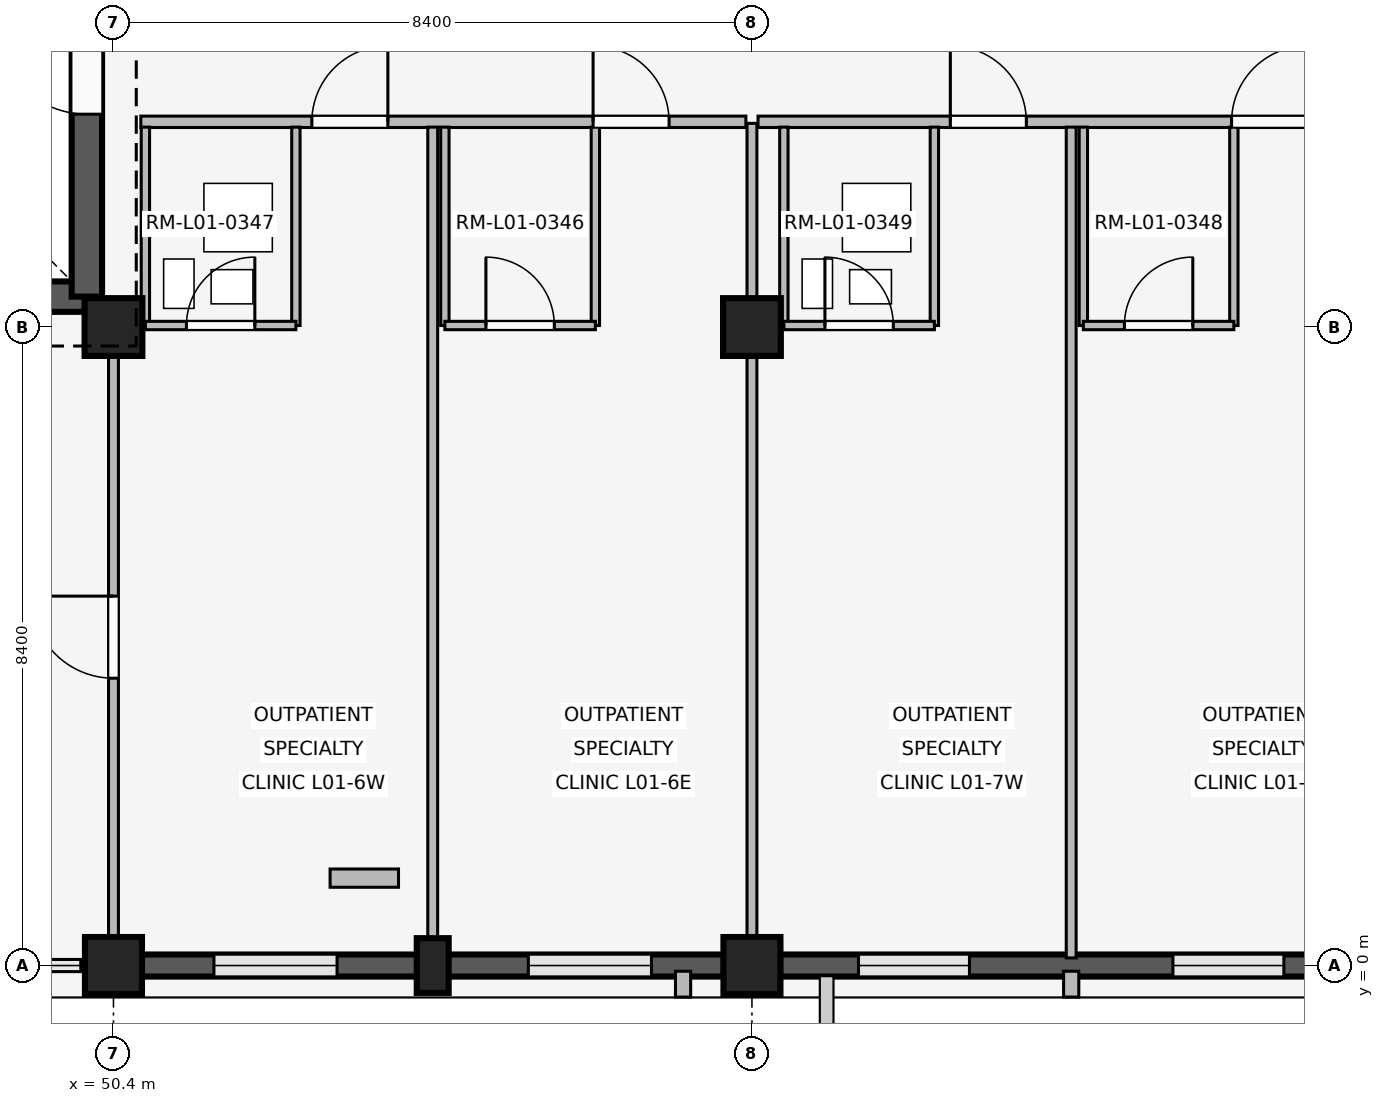
"""IFC4 building model, lengths in metres.
Left out: names, types, materials, properties, quantities, classifications, styles, units other than length and angle.
Written with IfcOpenShell. Run it as: python <this file> out.ifc"""

import sys

from ifc_helpers import new_model, si_unit, direction, frame, frame_2d, origin, origin_2d, place, context, subcontext, project, spatial, rectangle, extrude, element, fill, save


model = new_model("IFC4")
c1 = context("Model", 3, precision=1e-05, world=origin(), true_north=direction((0.0, 1.0)))
c2 = subcontext(c1, "Body", "Model", "MODEL_VIEW")
j1 = project(units=[si_unit("LENGTHUNIT", "METRE"), si_unit("PLANEANGLEUNIT", "RADIAN")], contexts=[c1])
p1 = place(None, origin())
s1 = spatial("IfcSite", under=j1, at=p1, CompositionType="ELEMENT")
p2 = place(p1, origin())
s2 = spatial("IfcBuilding", under=s1, at=p2, CompositionType="ELEMENT")
p3 = place(p2, frame((0.0, 0.0, 4.8)))
s3 = spatial("IfcBuildingStorey", under=s2, at=p3, CompositionType="ELEMENT", Elevation=4.8)
p4 = place(p3, frame((50.4, 0.0, 0.0), z_axis=(0.0, 0.0, 1.0), x_axis=(1.0, 0.0, 0.0)))
e1 = element("IfcColumn", 1, at=p4, inside=s3, PredefinedType="COLUMN", context=c2, shape_type="SweptSolid", body=[
    extrude(rectangle(XDim=0.75, YDim=0.75, at=origin_2d()), origin(), (0.0, 0.0, 1.0), 3.3),
])
p5 = place(p3, frame((50.4, 8.4, 0.0), z_axis=(0.0, 0.0, 1.0), x_axis=(1.0, 0.0, 0.0)))
e2 = element("IfcColumn", 2, at=p5, inside=s3, PredefinedType="COLUMN", context=c2, shape_type="SweptSolid", body=[
    extrude(rectangle(XDim=0.76, YDim=0.76, at=origin_2d()), origin(), (0.0, 0.0, 1.0), 3.3),
])
p6 = place(p3, frame((58.8, 0.0, 0.0), z_axis=(0.0, 0.0, 1.0), x_axis=(1.0, 0.0, 0.0)))
e3 = element("IfcColumn", 3, at=p6, inside=s3, PredefinedType="COLUMN", context=c2, shape_type="SweptSolid", body=[
    extrude(rectangle(XDim=0.75, YDim=0.75, at=origin_2d()), origin(), (0.0, 0.0, 1.0), 3.3),
])
p7 = place(p3, frame((58.8, 8.4, 0.0), z_axis=(0.0, 0.0, 1.0), x_axis=(1.0, 0.0, 0.0)))
e4 = element("IfcColumn", 4, at=p7, inside=s3, PredefinedType="COLUMN", context=c2, shape_type="SweptSolid", body=[
    extrude(rectangle(XDim=0.76, YDim=0.76, at=origin_2d()), origin(), (0.0, 0.0, 1.0), 3.3),
])
p8 = place(p3, frame((54.6, 0.0, 0.0), z_axis=(0.0, 0.0, 1.0), x_axis=(1.0, 0.0, 0.0)))
e5 = element("IfcColumn", 5, at=p8, inside=s3, PredefinedType="PILASTER", context=c2, shape_type="SweptSolid", body=[
    extrude(rectangle(XDim=0.42, YDim=0.72, at=origin_2d()), origin(), (0.0, 0.0, 1.0), 3.3),
])
p9 = place(p3, frame((58.43, 0.0, 0.0), z_axis=(0.0, 0.0, 1.0), x_axis=(-1.0, 0.0, 0.0)))
e6 = element("IfcWall", 6, at=p9, inside=s3, PredefinedType="SOLIDWALL", context=c2, shape_type="SweptSolid", body=[
    extrude(rectangle(XDim=7.66, YDim=0.29, at=frame_2d((3.83, 0.0))), origin(), (0.0, 0.0, 1.0), 2.42),
])
p10 = place(p9, frame((0.952, 0.0, 0.85)))
e7 = element("IfcOpeningElement", 7, at=p10, cuts=e6, PredefinedType="OPENING", context=c2, shape_type="SweptSolid", body=[
    extrude(rectangle(XDim=1.62, YDim=0.95, at=frame_2d((0.81, 0.475))), frame((0.0, 0.155, 0.0), z_axis=(0.0, -1.0, 0.0), x_axis=(1.0, 0.0, 0.0)), (0.0, 0.0, 1.0), 0.31),
])
p11 = place(p9, frame((5.088, 0.0, 0.85)))
e8 = element("IfcOpeningElement", 8, at=p11, cuts=e6, PredefinedType="OPENING", context=c2, shape_type="SweptSolid", body=[
    extrude(rectangle(XDim=1.62, YDim=0.95, at=frame_2d((0.81, 0.475))), frame((0.0, 0.155, 0.0), z_axis=(0.0, -1.0, 0.0), x_axis=(1.0, 0.0, 0.0)), (0.0, 0.0, 1.0), 0.31),
])
p12 = place(p3, frame((57.894, -0.075, 0.0), z_axis=(0.0, 0.0, 1.0), x_axis=(0.0, -1.0, 0.0)))
e9 = element("IfcWall", 9, at=p12, inside=s3, PredefinedType="ELEMENTEDWALL", context=c2, shape_type="SweptSolid", body=[
    extrude(rectangle(XDim=0.34, YDim=0.2, at=frame_2d((0.17, 0.0))), origin(), (0.0, 0.0, 1.0), 2.4),
])
p13 = place(p3, frame((66.83, 0.0, 0.0), z_axis=(0.0, 0.0, 1.0), x_axis=(-1.0, 0.0, 0.0)))
e10 = element("IfcWall", 10, at=p13, inside=s3, PredefinedType="SOLIDWALL", context=c2, shape_type="SweptSolid", body=[
    extrude(rectangle(XDim=7.66, YDim=0.29, at=frame_2d((3.83, 0.0))), origin(), (0.0, 0.0, 1.0), 2.42),
])
p14 = place(p13, frame((1.032, 0.0, 0.85)))
e11 = element("IfcOpeningElement", 11, at=p14, cuts=e10, PredefinedType="OPENING", context=c2, shape_type="SweptSolid", body=[
    extrude(rectangle(XDim=1.46, YDim=0.85, at=frame_2d((0.73, 0.425))), frame((0.0, 0.155, 0.0), z_axis=(0.0, -1.0, 0.0), x_axis=(1.0, 0.0, 0.0)), (0.0, 0.0, 1.0), 0.31),
])
p15 = place(p13, frame((5.168, 0.0, 0.85)))
e12 = element("IfcOpeningElement", 12, at=p15, cuts=e10, PredefinedType="OPENING", context=c2, shape_type="SweptSolid", body=[
    extrude(rectangle(XDim=1.46, YDim=0.85, at=frame_2d((0.73, 0.425))), frame((0.0, 0.155, 0.0), z_axis=(0.0, -1.0, 0.0), x_axis=(1.0, 0.0, 0.0)), (0.0, 0.0, 1.0), 0.31),
])
p16 = place(p3, frame((63.0, -0.075, 0.0), z_axis=(0.0, 0.0, 1.0), x_axis=(0.0, -1.0, 0.0)))
e13 = element("IfcWall", 13, at=p16, inside=s3, PredefinedType="ELEMENTEDWALL", context=c2, shape_type="SweptSolid", body=[
    extrude(rectangle(XDim=0.34, YDim=0.2, at=frame_2d((0.17, 0.0))), origin(), (0.0, 0.0, 1.0), 2.4),
])
p17 = place(p3, frame((42.55, 8.8, 0.0), z_axis=(0.0, 0.0, 1.0), x_axis=(1.0, 0.0, 0.0)))
e14 = element("IfcWall", 14, at=p17, inside=s3, PredefinedType="SHEAR", context=c2, shape_type="SweptSolid", body=[
    extrude(rectangle(XDim=7.5, YDim=0.4, at=frame_2d((3.75, 0.0))), origin(), (0.0, 0.0, 1.0), 3.02),
])
p18 = place(p17, frame((4.85, 0.0, 0.0)))
e15 = element("IfcOpeningElement", 15, at=p18, cuts=e14, PredefinedType="OPENING", context=c2, shape_type="SweptSolid", body=[
    extrude(rectangle(XDim=1.2, YDim=2.1, at=frame_2d((0.6, 1.05))), frame((0.0, 0.21, 0.0), z_axis=(0.0, -1.0, 0.0), x_axis=(1.0, 0.0, 0.0)), (0.0, 0.0, 1.0), 0.42),
])
p19 = place(p3, frame((50.05, 8.8, 0.0), z_axis=(0.0, 0.0, 1.0), x_axis=(0.0, 1.0, 0.0)))
e16 = element("IfcWall", 16, at=p19, inside=s3, PredefinedType="SHEAR", context=c2, shape_type="SweptSolid", body=[
    extrude(rectangle(XDim=7.55, YDim=0.4, at=frame_2d((3.775, 0.0))), origin(), (0.0, 0.0, 1.0), 3.02),
])
p20 = place(p19, frame((2.4, 0.0, 0.0)))
e17 = element("IfcOpeningElement", 17, at=p20, cuts=e16, PredefinedType="OPENING", context=c2, shape_type="SweptSolid", body=[
    extrude(rectangle(XDim=1.2, YDim=2.2, at=frame_2d((0.6, 1.1))), frame((0.0, 0.21, 0.0), z_axis=(0.0, -1.0, 0.0), x_axis=(1.0, 0.0, 0.0)), (0.0, 0.0, 1.0), 0.42),
])
p21 = place(p3, frame((50.4, 0.14, 0.0), z_axis=(0.0, 0.0, 1.0), x_axis=(0.0, 1.0, 0.0)))
e18 = element("IfcWall", 18, at=p21, inside=s3, PredefinedType="PARTITIONING", context=c2, shape_type="SweptSolid", body=[
    extrude(rectangle(XDim=8.21, YDim=0.13, at=frame_2d((4.105, 0.0))), origin(), (0.0, 0.0, 1.0), 2.4),
])
p22 = place(p21, frame((3.64, 0.0, 0.0)))
e19 = element("IfcOpeningElement", 19, at=p22, cuts=e18, PredefinedType="OPENING", context=c2, shape_type="SweptSolid", body=[
    extrude(rectangle(XDim=1.08, YDim=2.15, at=frame_2d((0.54, 1.075))), frame((0.0, 0.075, 0.0), z_axis=(0.0, -1.0, 0.0), x_axis=(1.0, 0.0, 0.0)), (0.0, 0.0, 1.0), 0.15),
])
p23 = place(p3, frame((50.76, 11.1, 0.0), z_axis=(0.0, 0.0, 1.0), x_axis=(1.0, 0.0, 0.0)))
e20 = element("IfcWall", 20, at=p23, inside=s3, PredefinedType="PARTITIONING", context=c2, shape_type="SweptSolid", body=[
    extrude(rectangle(XDim=7.96, YDim=0.15, at=frame_2d((3.98, 0.0))), origin(), (0.0, 0.0, 1.0), 2.4),
])
p24 = place(p23, frame((2.25, 0.0, 0.0)))
e21 = element("IfcOpeningElement", 21, at=p24, cuts=e20, PredefinedType="OPENING", context=c2, shape_type="SweptSolid", body=[
    extrude(rectangle(XDim=1.0, YDim=2.15, at=frame_2d((0.5, 1.075))), frame((0.0, 0.085, 0.0), z_axis=(0.0, -1.0, 0.0), x_axis=(1.0, 0.0, 0.0)), (0.0, 0.0, 1.0), 0.17),
])
p25 = place(p23, frame((5.95, 0.0, 0.0)))
e22 = element("IfcOpeningElement", 22, at=p25, cuts=e20, PredefinedType="OPENING", context=c2, shape_type="SweptSolid", body=[
    extrude(rectangle(XDim=1.0, YDim=2.15, at=frame_2d((0.5, 1.075))), frame((0.0, 0.085, 0.0), z_axis=(0.0, -1.0, 0.0), x_axis=(1.0, 0.0, 0.0)), (0.0, 0.0, 1.0), 0.17),
])
p26 = place(p3, frame((54.6, 0.1, 0.0), z_axis=(0.0, 0.0, 1.0), x_axis=(0.0, 1.0, 0.0)))
e23 = element("IfcWall", 23, at=p26, inside=s3, PredefinedType="PARTITIONING", context=c2, shape_type="SweptSolid", body=[
    extrude(rectangle(XDim=10.93, YDim=0.13, at=frame_2d((5.465, 0.0))), origin(), (0.0, 0.0, 1.0), 2.4),
])
for number, where, z_axis, x_axis in (
    (24, (50.82, 8.42, 0.0), (0.0, 0.0, 1.0), (0.0, 1.0, 0.0)),
    (25, (52.8, 8.42, 0.0), (0.0, 0.0, 1.0), (0.0, 1.0, 0.0)),
):
    element("IfcWall", number, at=place(p3, frame(where, z_axis=z_axis, x_axis=x_axis)), inside=s3, PredefinedType="PARTITIONING", context=c2, shape_type="SweptSolid", body=[
        extrude(rectangle(XDim=2.61, YDim=0.11, at=frame_2d((1.305, 0.0))), origin(), (0.0, 0.0, 1.0), 2.4),
    ])
p27 = place(p3, frame((50.82, 8.42, 0.0), z_axis=(0.0, 0.0, 1.0), x_axis=(1.0, 0.0, 0.0)))
e26 = element("IfcWall", 26, at=p27, inside=s3, PredefinedType="PARTITIONING", context=c2, shape_type="SweptSolid", body=[
    extrude(rectangle(XDim=1.98, YDim=0.11, at=frame_2d((0.99, 0.0))), origin(), (0.0, 0.0, 1.0), 2.4),
])
p28 = place(p27, frame((0.54, 0.0, 0.0)))
e27 = element("IfcOpeningElement", 27, at=p28, cuts=e26, PredefinedType="OPENING", context=c2, shape_type="SweptSolid", body=[
    extrude(rectangle(XDim=0.9, YDim=2.1, at=frame_2d((0.45, 1.05))), frame((0.0, 0.065, 0.0), z_axis=(0.0, -1.0, 0.0), x_axis=(1.0, 0.0, 0.0)), (0.0, 0.0, 1.0), 0.13),
])
for number, where, z_axis, x_axis in (
    (28, (54.76, 8.42, 0.0), (0.0, 0.0, 1.0), (0.0, 1.0, 0.0)),
    (29, (56.74, 8.42, 0.0), (0.0, 0.0, 1.0), (0.0, 1.0, 0.0)),
):
    element("IfcWall", number, at=place(p3, frame(where, z_axis=z_axis, x_axis=x_axis)), inside=s3, PredefinedType="PARTITIONING", context=c2, shape_type="SweptSolid", body=[
        extrude(rectangle(XDim=2.61, YDim=0.11, at=frame_2d((1.305, 0.0))), origin(), (0.0, 0.0, 1.0), 2.4),
    ])
p29 = place(p3, frame((54.76, 8.42, 0.0), z_axis=(0.0, 0.0, 1.0), x_axis=(1.0, 0.0, 0.0)))
e30 = element("IfcWall", 30, at=p29, inside=s3, PredefinedType="PARTITIONING", context=c2, shape_type="SweptSolid", body=[
    extrude(rectangle(XDim=1.98, YDim=0.11, at=frame_2d((0.99, 0.0))), origin(), (0.0, 0.0, 1.0), 2.4),
])
p30 = place(p29, frame((0.54, 0.0, 0.0)))
e31 = element("IfcOpeningElement", 31, at=p30, cuts=e30, PredefinedType="OPENING", context=c2, shape_type="SweptSolid", body=[
    extrude(rectangle(XDim=0.9, YDim=2.1, at=frame_2d((0.45, 1.05))), frame((0.0, 0.065, 0.0), z_axis=(0.0, -1.0, 0.0), x_axis=(1.0, 0.0, 0.0)), (0.0, 0.0, 1.0), 0.13),
])
p31 = place(p3, frame((53.25, 1.15, 0.0), z_axis=(0.0, 0.0, 1.0), x_axis=(1.0, 0.0, 0.0)))
e32 = element("IfcWall", 32, at=p31, inside=s3, PredefinedType="PLUMBINGWALL", context=c2, shape_type="SweptSolid", body=[
    extrude(rectangle(XDim=0.9, YDim=0.24, at=frame_2d((0.45, 0.0))), origin(), (0.0, 0.0, 1.0), 2.4),
])
p32 = place(p3, frame((58.8, 0.14, 0.0), z_axis=(0.0, 0.0, 1.0), x_axis=(0.0, 1.0, 0.0)))
e33 = element("IfcWall", 33, at=p32, inside=s3, PredefinedType="PARTITIONING", context=c2, shape_type="SweptSolid", body=[
    extrude(rectangle(XDim=10.94, YDim=0.13, at=frame_2d((5.47, 0.0))), origin(), (0.0, 0.0, 1.0), 2.4),
])
p33 = place(p3, frame((58.88, 11.1, 0.0), z_axis=(0.0, 0.0, 1.0), x_axis=(1.0, 0.0, 0.0)))
e34 = element("IfcWall", 34, at=p33, inside=s3, PredefinedType="PARTITIONING", context=c2, shape_type="SweptSolid", body=[
    extrude(rectangle(XDim=8.24, YDim=0.15, at=frame_2d((4.12, 0.0))), origin(), (0.0, 0.0, 1.0), 2.4),
])
p34 = place(p33, frame((2.53, 0.0, 0.0)))
e35 = element("IfcOpeningElement", 35, at=p34, cuts=e34, PredefinedType="OPENING", context=c2, shape_type="SweptSolid", body=[
    extrude(rectangle(XDim=1.0, YDim=2.15, at=frame_2d((0.5, 1.075))), frame((0.0, 0.085, 0.0), z_axis=(0.0, -1.0, 0.0), x_axis=(1.0, 0.0, 0.0)), (0.0, 0.0, 1.0), 0.17),
])
p35 = place(p33, frame((6.23, 0.0, 0.0)))
e36 = element("IfcOpeningElement", 36, at=p35, cuts=e34, PredefinedType="OPENING", context=c2, shape_type="SweptSolid", body=[
    extrude(rectangle(XDim=1.0, YDim=2.15, at=frame_2d((0.5, 1.075))), frame((0.0, 0.085, 0.0), z_axis=(0.0, -1.0, 0.0), x_axis=(1.0, 0.0, 0.0)), (0.0, 0.0, 1.0), 0.17),
])
p36 = place(p3, frame((63.0, 0.1, 0.0), z_axis=(0.0, 0.0, 1.0), x_axis=(0.0, 1.0, 0.0)))
e37 = element("IfcWall", 37, at=p36, inside=s3, PredefinedType="PARTITIONING", context=c2, shape_type="SweptSolid", body=[
    extrude(rectangle(XDim=10.93, YDim=0.13, at=frame_2d((5.465, 0.0))), origin(), (0.0, 0.0, 1.0), 2.4),
])
for number, where, z_axis, x_axis in (
    (38, (59.22, 8.42, 0.0), (0.0, 0.0, 1.0), (0.0, 1.0, 0.0)),
    (39, (61.2, 8.42, 0.0), (0.0, 0.0, 1.0), (0.0, 1.0, 0.0)),
):
    element("IfcWall", number, at=place(p3, frame(where, z_axis=z_axis, x_axis=x_axis)), inside=s3, PredefinedType="PARTITIONING", context=c2, shape_type="SweptSolid", body=[
        extrude(rectangle(XDim=2.61, YDim=0.11, at=frame_2d((1.305, 0.0))), origin(), (0.0, 0.0, 1.0), 2.4),
    ])
p37 = place(p3, frame((59.22, 8.42, 0.0), z_axis=(0.0, 0.0, 1.0), x_axis=(1.0, 0.0, 0.0)))
e40 = element("IfcWall", 40, at=p37, inside=s3, PredefinedType="PARTITIONING", context=c2, shape_type="SweptSolid", body=[
    extrude(rectangle(XDim=1.98, YDim=0.11, at=frame_2d((0.99, 0.0))), origin(), (0.0, 0.0, 1.0), 2.4),
])
p38 = place(p37, frame((0.54, 0.0, 0.0)))
e41 = element("IfcOpeningElement", 41, at=p38, cuts=e40, PredefinedType="OPENING", context=c2, shape_type="SweptSolid", body=[
    extrude(rectangle(XDim=0.9, YDim=2.1, at=frame_2d((0.45, 1.05))), frame((0.0, 0.065, 0.0), z_axis=(0.0, -1.0, 0.0), x_axis=(1.0, 0.0, 0.0)), (0.0, 0.0, 1.0), 0.13),
])
for number, where, z_axis, x_axis in (
    (42, (63.16, 8.42, 0.0), (0.0, 0.0, 1.0), (0.0, 1.0, 0.0)),
    (43, (65.14, 8.42, 0.0), (0.0, 0.0, 1.0), (0.0, 1.0, 0.0)),
):
    element("IfcWall", number, at=place(p3, frame(where, z_axis=z_axis, x_axis=x_axis)), inside=s3, PredefinedType="PARTITIONING", context=c2, shape_type="SweptSolid", body=[
        extrude(rectangle(XDim=2.61, YDim=0.11, at=frame_2d((1.305, 0.0))), origin(), (0.0, 0.0, 1.0), 2.4),
    ])
p39 = place(p3, frame((63.16, 8.42, 0.0), z_axis=(0.0, 0.0, 1.0), x_axis=(1.0, 0.0, 0.0)))
e44 = element("IfcWall", 44, at=p39, inside=s3, PredefinedType="PARTITIONING", context=c2, shape_type="SweptSolid", body=[
    extrude(rectangle(XDim=1.98, YDim=0.11, at=frame_2d((0.99, 0.0))), origin(), (0.0, 0.0, 1.0), 2.4),
])
p40 = place(p39, frame((0.54, 0.0, 0.0)))
e45 = element("IfcOpeningElement", 45, at=p40, cuts=e44, PredefinedType="OPENING", context=c2, shape_type="SweptSolid", body=[
    extrude(rectangle(XDim=0.9, YDim=2.1, at=frame_2d((0.45, 1.05))), frame((0.0, 0.065, 0.0), z_axis=(0.0, -1.0, 0.0), x_axis=(1.0, 0.0, 0.0)), (0.0, 0.0, 1.0), 0.13),
])
p41 = place(p10, origin())
e46 = element("IfcWindow", 46, at=p41, inside=s3, PartitioningType="SINGLE_PANEL", PredefinedType="WINDOW", context=c2, shape_type="SweptSolid", body=[
    extrude(rectangle(XDim=1.62, YDim=0.95, at=frame_2d((0.81, 0.475))), frame((0.0, 0.03, 0.0), z_axis=(0.0, -1.0, 0.0), x_axis=(1.0, 0.0, 0.0)), (0.0, 0.0, 1.0), 0.06),
])
fill(e7, e46)
p42 = place(p11, origin())
e47 = element("IfcWindow", 47, at=p42, inside=s3, PartitioningType="SINGLE_PANEL", PredefinedType="WINDOW", context=c2, shape_type="SweptSolid", body=[
    extrude(rectangle(XDim=1.62, YDim=0.95, at=frame_2d((0.81, 0.475))), frame((0.0, 0.03, 0.0), z_axis=(0.0, -1.0, 0.0), x_axis=(1.0, 0.0, 0.0)), (0.0, 0.0, 1.0), 0.06),
])
fill(e8, e47)
p43 = place(p14, origin())
e48 = element("IfcWindow", 48, at=p43, inside=s3, PartitioningType="SINGLE_PANEL", PredefinedType="WINDOW", context=c2, shape_type="SweptSolid", body=[
    extrude(rectangle(XDim=1.46, YDim=0.85, at=frame_2d((0.73, 0.425))), frame((0.0, 0.03, 0.0), z_axis=(0.0, -1.0, 0.0), x_axis=(1.0, 0.0, 0.0)), (0.0, 0.0, 1.0), 0.06),
])
fill(e11, e48)
p44 = place(p15, origin())
e49 = element("IfcWindow", 49, at=p44, inside=s3, PartitioningType="SINGLE_PANEL", PredefinedType="WINDOW", context=c2, shape_type="SweptSolid", body=[
    extrude(rectangle(XDim=1.46, YDim=0.85, at=frame_2d((0.73, 0.425))), frame((0.0, 0.03, 0.0), z_axis=(0.0, -1.0, 0.0), x_axis=(1.0, 0.0, 0.0)), (0.0, 0.0, 1.0), 0.06),
])
fill(e12, e49)
p45 = place(p20, origin())
e50 = element("IfcDoor", 50, at=p45, inside=s3, OperationType="SINGLE_SWING_RIGHT", PredefinedType="DOOR", context=c2, shape_type="SweptSolid", body=[
    extrude(rectangle(XDim=1.2, YDim=2.2, at=frame_2d((0.6, 1.1))), frame((0.0, 0.025, 0.0), z_axis=(0.0, -1.0, 0.0), x_axis=(1.0, 0.0, 0.0)), (0.0, 0.0, 1.0), 0.05),
])
fill(e17, e50)
p46 = place(p22, origin())
e51 = element("IfcDoor", 51, at=p46, inside=s3, OperationType="SINGLE_SWING_RIGHT", PredefinedType="DOOR", context=c2, shape_type="SweptSolid", body=[
    extrude(rectangle(XDim=1.08, YDim=2.15, at=frame_2d((0.54, 1.075))), frame((0.0, 0.025, 0.0), z_axis=(0.0, -1.0, 0.0), x_axis=(1.0, 0.0, 0.0)), (0.0, 0.0, 1.0), 0.05),
])
fill(e19, e51)
p47 = place(p24, origin())
e52 = element("IfcDoor", 52, at=p47, inside=s3, OperationType="SINGLE_SWING_RIGHT", PredefinedType="DOOR", context=c2, shape_type="SweptSolid", body=[
    extrude(rectangle(XDim=1.0, YDim=2.15, at=frame_2d((0.5, 1.075))), frame((0.0, 0.025, 0.0), z_axis=(0.0, -1.0, 0.0), x_axis=(1.0, 0.0, 0.0)), (0.0, 0.0, 1.0), 0.05),
])
fill(e21, e52)
p48 = place(p25, origin())
e53 = element("IfcDoor", 53, at=p48, inside=s3, OperationType="SINGLE_SWING_LEFT", PredefinedType="DOOR", context=c2, shape_type="SweptSolid", body=[
    extrude(rectangle(XDim=1.0, YDim=2.15, at=frame_2d((0.5, 1.075))), frame((0.0, 0.025, 0.0), z_axis=(0.0, -1.0, 0.0), x_axis=(1.0, 0.0, 0.0)), (0.0, 0.0, 1.0), 0.05),
])
fill(e22, e53)
p49 = place(p28, origin())
e54 = element("IfcDoor", 54, at=p49, inside=s3, OperationType="SINGLE_SWING_RIGHT", PredefinedType="DOOR", context=c2, shape_type="SweptSolid", body=[
    extrude(rectangle(XDim=0.9, YDim=2.1, at=frame_2d((0.45, 1.05))), frame((0.0, 0.025, 0.0), z_axis=(0.0, -1.0, 0.0), x_axis=(1.0, 0.0, 0.0)), (0.0, 0.0, 1.0), 0.05),
])
fill(e27, e54)
p50 = place(p30, origin())
e55 = element("IfcDoor", 55, at=p50, inside=s3, OperationType="SINGLE_SWING_LEFT", PredefinedType="DOOR", context=c2, shape_type="SweptSolid", body=[
    extrude(rectangle(XDim=0.9, YDim=2.1, at=frame_2d((0.45, 1.05))), frame((0.0, 0.025, 0.0), z_axis=(0.0, -1.0, 0.0), x_axis=(1.0, 0.0, 0.0)), (0.0, 0.0, 1.0), 0.05),
])
fill(e31, e55)
p51 = place(p34, origin())
e56 = element("IfcDoor", 56, at=p51, inside=s3, OperationType="SINGLE_SWING_LEFT", PredefinedType="DOOR", context=c2, shape_type="SweptSolid", body=[
    extrude(rectangle(XDim=1.0, YDim=2.15, at=frame_2d((0.5, 1.075))), frame((0.0, 0.025, 0.0), z_axis=(0.0, -1.0, 0.0), x_axis=(1.0, 0.0, 0.0)), (0.0, 0.0, 1.0), 0.05),
])
fill(e35, e56)
p52 = place(p35, origin())
e57 = element("IfcDoor", 57, at=p52, inside=s3, OperationType="SINGLE_SWING_RIGHT", PredefinedType="DOOR", context=c2, shape_type="SweptSolid", body=[
    extrude(rectangle(XDim=1.0, YDim=2.15, at=frame_2d((0.5, 1.075))), frame((0.0, 0.025, 0.0), z_axis=(0.0, -1.0, 0.0), x_axis=(1.0, 0.0, 0.0)), (0.0, 0.0, 1.0), 0.05),
])
fill(e36, e57)
p53 = place(p38, origin())
e58 = element("IfcDoor", 58, at=p53, inside=s3, OperationType="SINGLE_SWING_LEFT", PredefinedType="DOOR", context=c2, shape_type="SweptSolid", body=[
    extrude(rectangle(XDim=0.9, YDim=2.1, at=frame_2d((0.45, 1.05))), frame((0.0, 0.025, 0.0), z_axis=(0.0, -1.0, 0.0), x_axis=(1.0, 0.0, 0.0)), (0.0, 0.0, 1.0), 0.05),
])
fill(e41, e58)
p54 = place(p40, origin())
e59 = element("IfcDoor", 59, at=p54, inside=s3, OperationType="SINGLE_SWING_RIGHT", PredefinedType="DOOR", context=c2, shape_type="SweptSolid", body=[
    extrude(rectangle(XDim=0.9, YDim=2.1, at=frame_2d((0.45, 1.05))), frame((0.0, 0.025, 0.0), z_axis=(0.0, -1.0, 0.0), x_axis=(1.0, 0.0, 0.0)), (0.0, 0.0, 1.0), 0.05),
])
fill(e45, e59)
save(model, sys.argv[1])
